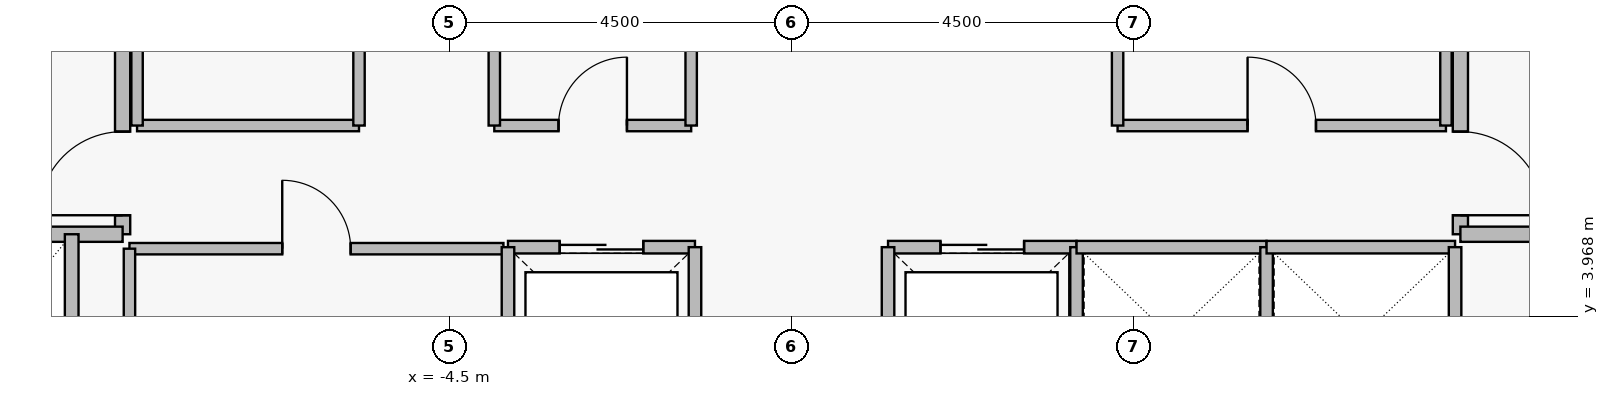
"""IFC4 building model, lengths in metres.
Left out: names, types, materials, properties, quantities, classifications, styles, units other than length and angle.
Written with IfcOpenShell. Run it as: python <this file> out.ifc"""

import sys

from ifc_helpers import new_model, si_unit, direction, frame, frame_2d, origin, place, context, subcontext, project, spatial, rectangle, extrude, element, fill, save


model = new_model("IFC4")
c1 = context("Model", 3, precision=1e-05, world=origin(), true_north=direction((0.0, 1.0)))
c2 = subcontext(c1, "Body", "Model", "MODEL_VIEW")
j1 = project(units=[si_unit("LENGTHUNIT", "METRE"), si_unit("PLANEANGLEUNIT", "RADIAN")], contexts=[c1])
p1 = place(None, origin())
s1 = spatial("IfcSite", under=j1, at=p1, CompositionType="ELEMENT")
p2 = place(p1, origin())
s2 = spatial("IfcBuilding", under=s1, at=p2, CompositionType="ELEMENT")
p3 = place(p2, frame((0.0, 0.0, 211.15)))
s3 = spatial("IfcBuildingStorey", under=s2, at=p3, CompositionType="ELEMENT", Elevation=211.15)
p4 = place(p3, frame((-8.8, 5.05, 0.0), z_axis=(0.0, 0.0, 1.0), x_axis=(0.0, 1.0, 0.0)))
e1 = element("IfcWall", 1, at=p4, inside=s3, PredefinedType="PARTITIONING", context=c2, shape_type="SweptSolid", body=[
    extrude(rectangle(XDim=6.1, YDim=0.2, at=frame_2d((3.05, 0.0))), origin(), (0.0, 0.0, 1.0), 3.53),
])
p5 = place(p4, frame((0.25, 0.0, 0.0)))
e2 = element("IfcOpeningElement", 2, at=p5, cuts=e1, PredefinedType="OPENING", context=c2, shape_type="SweptSolid", body=[
    extrude(rectangle(XDim=1.1, YDim=2.2, at=frame_2d((0.55, 1.1))), frame((0.0, 0.11, 0.0), z_axis=(0.0, -1.0, 0.0), x_axis=(1.0, 0.0, 0.0)), (0.0, 0.0, 1.0), 0.22),
])
p6 = place(p4, frame((3.85, 0.0, 0.0)))
e3 = element("IfcOpeningElement", 3, at=p6, cuts=e1, PredefinedType="OPENING", context=c2, shape_type="SweptSolid", body=[
    extrude(rectangle(XDim=1.1, YDim=2.2, at=frame_2d((0.55, 1.1))), frame((0.0, 0.11, 0.0), z_axis=(0.0, -1.0, 0.0), x_axis=(1.0, 0.0, 0.0)), (0.0, 0.0, 1.0), 0.22),
])
p7 = place(p3, frame((8.8, 11.15, 0.0), z_axis=(0.0, 0.0, 1.0), x_axis=(0.0, -1.0, 0.0)))
e4 = element("IfcWall", 4, at=p7, inside=s3, PredefinedType="PARTITIONING", context=c2, shape_type="SweptSolid", body=[
    extrude(rectangle(XDim=6.1, YDim=0.2, at=frame_2d((3.05, 0.0))), origin(), (0.0, 0.0, 1.0), 3.53),
])
p8 = place(p7, frame((1.15, 0.0, 0.0)))
e5 = element("IfcOpeningElement", 5, at=p8, cuts=e4, PredefinedType="OPENING", context=c2, shape_type="SweptSolid", body=[
    extrude(rectangle(XDim=1.1, YDim=2.2, at=frame_2d((0.55, 1.1))), frame((0.0, 0.11, 0.0), z_axis=(0.0, -1.0, 0.0), x_axis=(1.0, 0.0, 0.0)), (0.0, 0.0, 1.0), 0.22),
])
p9 = place(p7, frame((4.75, 0.0, 0.0)))
e6 = element("IfcOpeningElement", 6, at=p9, cuts=e4, PredefinedType="OPENING", context=c2, shape_type="SweptSolid", body=[
    extrude(rectangle(XDim=1.1, YDim=2.2, at=frame_2d((0.55, 1.1))), frame((0.0, 0.11, 0.0), z_axis=(0.0, -1.0, 0.0), x_axis=(1.0, 0.0, 0.0)), (0.0, 0.0, 1.0), 0.22),
])
p10 = place(p3, frame((-3.73, 4.88, 0.0), z_axis=(0.0, 0.0, 1.0), x_axis=(1.0, 0.0, 0.0)))
e7 = element("IfcWall", 7, at=p10, inside=s3, PredefinedType="PARTITIONING", context=c2, shape_type="SweptSolid", body=[
    extrude(rectangle(XDim=2.46, YDim=0.165, at=frame_2d((1.23, 0.0))), origin(), (0.0, 0.0, 1.0), 3.53),
])
p11 = place(p10, frame((0.68, 0.0, 0.0)))
e8 = element("IfcOpeningElement", 8, at=p11, cuts=e7, PredefinedType="OPENING", context=c2, shape_type="SweptSolid", body=[
    extrude(rectangle(XDim=1.1, YDim=2.25, at=frame_2d((0.55, 1.125))), frame((0.0, 0.093, 0.0), z_axis=(0.0, -1.0, 0.0), x_axis=(1.0, 0.0, 0.0)), (0.0, 0.0, 1.0), 0.185),
])
p12 = place(p3, frame((1.27, 4.88, 0.0), z_axis=(0.0, 0.0, 1.0), x_axis=(1.0, 0.0, 0.0)))
e9 = element("IfcWall", 9, at=p12, inside=s3, PredefinedType="PARTITIONING", context=c2, shape_type="SweptSolid", body=[
    extrude(rectangle(XDim=2.48, YDim=0.165, at=frame_2d((1.24, 0.0))), origin(), (0.0, 0.0, 1.0), 3.53),
])
p13 = place(p12, frame((0.69, 0.0, 0.0)))
e10 = element("IfcOpeningElement", 10, at=p13, cuts=e9, PredefinedType="OPENING", context=c2, shape_type="SweptSolid", body=[
    extrude(rectangle(XDim=1.1, YDim=2.25, at=frame_2d((0.55, 1.125))), frame((0.0, 0.093, 0.0), z_axis=(0.0, -1.0, 0.0), x_axis=(1.0, 0.0, 0.0)), (0.0, 0.0, 1.0), 0.185),
])
p14 = place(p3, frame((-8.71, 4.86, 0.0), z_axis=(0.0, 0.0, 1.0), x_axis=(1.0, 0.0, 0.0)))
e11 = element("IfcWall", 11, at=p14, inside=s3, PredefinedType="PARTITIONING", context=c2, shape_type="SweptSolid", body=[
    extrude(rectangle(XDim=4.92, YDim=0.15, at=frame_2d((2.46, 0.0))), origin(), (0.0, 0.0, 1.0), 3.53),
])
p15 = place(p14, frame((2.01, 0.0, 0.0)))
e12 = element("IfcOpeningElement", 12, at=p15, cuts=e11, PredefinedType="OPENING", context=c2, shape_type="SweptSolid", body=[
    extrude(rectangle(XDim=0.9, YDim=2.15, at=frame_2d((0.45, 1.075))), frame((0.0, 0.085, 0.0), z_axis=(0.0, -1.0, 0.0), x_axis=(1.0, 0.0, 0.0)), (0.0, 0.0, 1.0), 0.17),
])
p16 = place(p3, frame((-3.91, 6.48, 0.0), z_axis=(0.0, 0.0, 1.0), x_axis=(1.0, 0.0, 0.0)))
e13 = element("IfcWall", 13, at=p16, inside=s3, PredefinedType="PARTITIONING", context=c2, shape_type="SweptSolid", body=[
    extrude(rectangle(XDim=2.59, YDim=0.15, at=frame_2d((1.295, 0.0))), origin(), (0.0, 0.0, 1.0), 3.53),
])
p17 = place(p16, frame((0.845, 0.0, 0.0)))
e14 = element("IfcOpeningElement", 14, at=p17, cuts=e13, PredefinedType="OPENING", context=c2, shape_type="SweptSolid", body=[
    extrude(rectangle(XDim=0.9, YDim=2.15, at=frame_2d((0.45, 1.075))), frame((0.0, 0.085, 0.0), z_axis=(0.0, -1.0, 0.0), x_axis=(1.0, 0.0, 0.0)), (0.0, 0.0, 1.0), 0.17),
])
p18 = place(p3, frame((4.29, 6.48, 0.0), z_axis=(0.0, 0.0, 1.0), x_axis=(1.0, 0.0, 0.0)))
e15 = element("IfcWall", 15, at=p18, inside=s3, PredefinedType="PARTITIONING", context=c2, shape_type="SweptSolid", body=[
    extrude(rectangle(XDim=4.32, YDim=0.15, at=frame_2d((2.16, 0.0))), origin(), (0.0, 0.0, 1.0), 3.53),
])
p19 = place(p18, frame((1.71, 0.0, 0.0)))
e16 = element("IfcOpeningElement", 16, at=p19, cuts=e15, PredefinedType="OPENING", context=c2, shape_type="SweptSolid", body=[
    extrude(rectangle(XDim=0.9, YDim=2.15, at=frame_2d((0.45, 1.075))), frame((0.0, 0.085, 0.0), z_axis=(0.0, -1.0, 0.0), x_axis=(1.0, 0.0, 0.0)), (0.0, 0.0, 1.0), 0.17),
])
for number, where, z_axis, x_axis in (
    (17, (-11.65, 5.05, 0.0), (0.0, 0.0, 1.0), (1.0, 0.0, 0.0)),
    (18, (8.8, 5.05, 0.0), (0.0, 0.0, 1.0), (1.0, 0.0, 0.0)),
):
    element("IfcWall", number, at=place(p3, frame(where, z_axis=z_axis, x_axis=x_axis)), inside=s3, PredefinedType="PARTITIONING", context=c2, shape_type="SweptSolid", body=[
        extrude(rectangle(XDim=2.85, YDim=0.2, at=frame_2d((1.425, 0.0))), origin(), (0.0, 0.0, 1.0), 3.53),
    ])
for number, where, z_axis, x_axis in (
    (19, (-3.73, 2.52, 0.0), (0.0, 0.0, 1.0), (0.0, 1.0, 0.0)),
    (20, (-1.27, 2.52, 0.0), (0.0, 0.0, 1.0), (0.0, 1.0, 0.0)),
    (21, (1.27, 2.52, 0.0), (0.0, 0.0, 1.0), (0.0, 1.0, 0.0)),
    (22, (3.75, 2.52, 0.0), (0.0, 0.0, 1.0), (0.0, 1.0, 0.0)),
):
    element("IfcWall", number, at=place(p3, frame(where, z_axis=z_axis, x_axis=x_axis)), inside=s3, PredefinedType="PARTITIONING", context=c2, shape_type="SweptSolid", body=[
        extrude(rectangle(XDim=2.36, YDim=0.165, at=frame_2d((1.18, 0.0))), origin(), (0.0, 0.0, 1.0), 3.53),
    ])
p20 = place(p3, frame((3.75, 4.88, 0.0), z_axis=(0.0, 0.0, 1.0), x_axis=(1.0, 0.0, 0.0)))
e23 = element("IfcWall", 23, at=p20, inside=s3, PredefinedType="PARTITIONING", context=c2, shape_type="SweptSolid", body=[
    extrude(rectangle(XDim=2.5, YDim=0.165, at=frame_2d((1.25, 0.0))), origin(), (0.0, 0.0, 1.0), 3.53),
])
p21 = place(p3, frame((6.25, 2.52, 0.0), z_axis=(0.0, 0.0, 1.0), x_axis=(0.0, 1.0, 0.0)))
e24 = element("IfcWall", 24, at=p21, inside=s3, PredefinedType="PARTITIONING", context=c2, shape_type="SweptSolid", body=[
    extrude(rectangle(XDim=2.36, YDim=0.165, at=frame_2d((1.18, 0.0))), origin(), (0.0, 0.0, 1.0), 3.53),
])
p22 = place(p3, frame((6.25, 4.88, 0.0), z_axis=(0.0, 0.0, 1.0), x_axis=(1.0, 0.0, 0.0)))
e25 = element("IfcWall", 25, at=p22, inside=s3, PredefinedType="PARTITIONING", context=c2, shape_type="SweptSolid", body=[
    extrude(rectangle(XDim=2.48, YDim=0.165, at=frame_2d((1.24, 0.0))), origin(), (0.0, 0.0, 1.0), 3.53),
])
p23 = place(p3, frame((8.73, 2.52, 0.0), z_axis=(0.0, 0.0, 1.0), x_axis=(0.0, 1.0, 0.0)))
e26 = element("IfcWall", 26, at=p23, inside=s3, PredefinedType="PARTITIONING", context=c2, shape_type="SweptSolid", body=[
    extrude(rectangle(XDim=2.36, YDim=0.165, at=frame_2d((1.18, 0.0))), origin(), (0.0, 0.0, 1.0), 3.53),
])
p24 = place(p3, frame((-8.71, 2.49, 0.0), z_axis=(0.0, 0.0, 1.0), x_axis=(0.0, 1.0, 0.0)))
e27 = element("IfcWall", 27, at=p24, inside=s3, PredefinedType="PARTITIONING", context=c2, shape_type="SweptSolid", body=[
    extrude(rectangle(XDim=2.37, YDim=0.15, at=frame_2d((1.185, 0.0))), origin(), (0.0, 0.0, 1.0), 3.53),
])
p25 = place(p3, frame((-9.47, 2.45, 0.0), z_axis=(0.0, 0.0, 1.0), x_axis=(0.0, 1.0, 0.0)))
e28 = element("IfcWall", 28, at=p25, inside=s3, PredefinedType="PARTITIONING", context=c2, shape_type="SweptSolid", body=[
    extrude(rectangle(XDim=2.6, YDim=0.18, at=frame_2d((1.3, 0.0))), origin(), (0.0, 0.0, 1.0), 3.53),
])
p26 = place(p3, frame((-8.61, 6.48, 0.0), z_axis=(0.0, 0.0, 1.0), x_axis=(1.0, 0.0, 0.0)))
e29 = element("IfcWall", 29, at=p26, inside=s3, PredefinedType="PARTITIONING", context=c2, shape_type="SweptSolid", body=[
    extrude(rectangle(XDim=2.92, YDim=0.15, at=frame_2d((1.46, 0.0))), origin(), (0.0, 0.0, 1.0), 3.53),
])
for number, where, z_axis, x_axis in (
    (30, (-8.61, 6.48, 0.0), (0.0, 0.0, 1.0), (0.0, 1.0, 0.0)),
    (31, (-5.69, 6.48, 0.0), (0.0, 0.0, 1.0), (0.0, 1.0, 0.0)),
    (32, (-3.91, 6.48, 0.0), (0.0, 0.0, 1.0), (0.0, 1.0, 0.0)),
    (33, (-1.32, 6.48, 0.0), (0.0, 0.0, 1.0), (0.0, 1.0, 0.0)),
    (34, (4.29, 6.48, 0.0), (0.0, 0.0, 1.0), (0.0, 1.0, 0.0)),
    (35, (8.61, 6.48, 0.0), (0.0, 0.0, 1.0), (0.0, 1.0, 0.0)),
):
    element("IfcWall", number, at=place(p3, frame(where, z_axis=z_axis, x_axis=x_axis)), inside=s3, PredefinedType="PARTITIONING", context=c2, shape_type="SweptSolid", body=[
        extrude(rectangle(XDim=2.24, YDim=0.15, at=frame_2d((1.12, 0.0))), origin(), (0.0, 0.0, 1.0), 3.53),
    ])
p27 = place(p5, origin())
e36 = element("IfcDoor", 36, at=p27, inside=s3, OperationType="SINGLE_SWING_LEFT", PredefinedType="DOOR", context=c2, shape_type="SweptSolid", body=[
    extrude(rectangle(XDim=1.1, YDim=2.2, at=frame_2d((0.55, 1.1))), frame((0.0, 0.025, 0.0), z_axis=(0.0, -1.0, 0.0), x_axis=(1.0, 0.0, 0.0)), (0.0, 0.0, 1.0), 0.05),
])
fill(e2, e36)
p28 = place(p9, origin())
e37 = element("IfcDoor", 37, at=p28, inside=s3, OperationType="SINGLE_SWING_RIGHT", PredefinedType="DOOR", context=c2, shape_type="SweptSolid", body=[
    extrude(rectangle(XDim=1.1, YDim=2.2, at=frame_2d((0.55, 1.1))), frame((0.0, 0.025, 0.0), z_axis=(0.0, -1.0, 0.0), x_axis=(1.0, 0.0, 0.0)), (0.0, 0.0, 1.0), 0.05),
])
fill(e6, e37)
p29 = place(p11, origin())
e38 = element("IfcDoor", 38, at=p29, inside=s3, OperationType="SLIDING_TO_LEFT", PredefinedType="DOOR", context=c2, shape_type="SweptSolid", body=[
    extrude(rectangle(XDim=1.1, YDim=2.25, at=frame_2d((0.55, 1.125))), frame((0.0, 0.025, 0.0), z_axis=(0.0, -1.0, 0.0), x_axis=(1.0, 0.0, 0.0)), (0.0, 0.0, 1.0), 0.05),
])
fill(e8, e38)
p30 = place(p13, origin())
e39 = element("IfcDoor", 39, at=p30, inside=s3, OperationType="SLIDING_TO_LEFT", PredefinedType="DOOR", context=c2, shape_type="SweptSolid", body=[
    extrude(rectangle(XDim=1.1, YDim=2.25, at=frame_2d((0.55, 1.125))), frame((0.0, 0.025, 0.0), z_axis=(0.0, -1.0, 0.0), x_axis=(1.0, 0.0, 0.0)), (0.0, 0.0, 1.0), 0.05),
])
fill(e10, e39)
p31 = place(p15, origin())
e40 = element("IfcDoor", 40, at=p31, inside=s3, OperationType="SINGLE_SWING_LEFT", PredefinedType="DOOR", context=c2, shape_type="SweptSolid", body=[
    extrude(rectangle(XDim=0.9, YDim=2.15, at=frame_2d((0.45, 1.075))), frame((0.0, 0.025, 0.0), z_axis=(0.0, -1.0, 0.0), x_axis=(1.0, 0.0, 0.0)), (0.0, 0.0, 1.0), 0.05),
])
fill(e12, e40)
p32 = place(p17, origin())
e41 = element("IfcDoor", 41, at=p32, inside=s3, OperationType="SINGLE_SWING_RIGHT", PredefinedType="DOOR", context=c2, shape_type="SweptSolid", body=[
    extrude(rectangle(XDim=0.9, YDim=2.15, at=frame_2d((0.45, 1.075))), frame((0.0, 0.025, 0.0), z_axis=(0.0, -1.0, 0.0), x_axis=(1.0, 0.0, 0.0)), (0.0, 0.0, 1.0), 0.05),
])
fill(e14, e41)
p33 = place(p19, origin())
e42 = element("IfcDoor", 42, at=p33, inside=s3, OperationType="SINGLE_SWING_LEFT", PredefinedType="DOOR", context=c2, shape_type="SweptSolid", body=[
    extrude(rectangle(XDim=0.9, YDim=2.15, at=frame_2d((0.45, 1.075))), frame((0.0, 0.025, 0.0), z_axis=(0.0, -1.0, 0.0), x_axis=(1.0, 0.0, 0.0)), (0.0, 0.0, 1.0), 0.05),
])
fill(e16, e42)
save(model, sys.argv[1])
